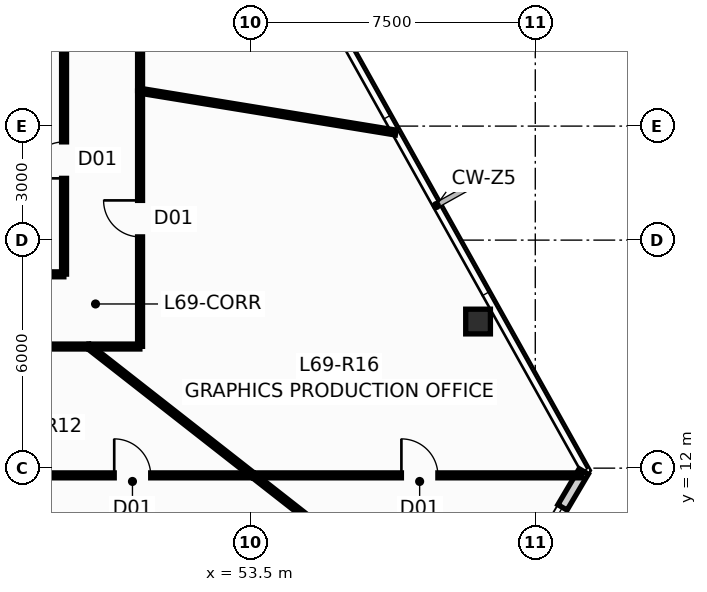
"""IFC4 building model, lengths in metres.
Left out: names, types, materials, properties, quantities, classifications, styles, units other than length and angle.
Written with IfcOpenShell. Run it as: python <this file> out.ifc"""

import sys

from ifc_helpers import new_model, si_unit, direction, frame, frame_2d, origin, origin_2d, place, context, subcontext, project, spatial, rectangle, hollow_rectangle, extrude, source, transform, mapped, element, fill, save


model = new_model("IFC4")
c1 = context("Model", 3, precision=1e-05, world=origin(), true_north=direction((0.0, 1.0)))
c2 = subcontext(c1, "Body", "Model", "MODEL_VIEW")
j1 = project(units=[si_unit("LENGTHUNIT", "METRE"), si_unit("PLANEANGLEUNIT", "RADIAN")], contexts=[c1])
p1 = place(None, origin())
s1 = spatial("IfcSite", under=j1, at=p1, CompositionType="ELEMENT")
p2 = place(p1, origin())
s2 = spatial("IfcBuilding", under=s1, at=p2, CompositionType="ELEMENT")
p3 = place(p2, frame((0.0, 0.0, 262.7)))
s3 = spatial("IfcBuildingStorey", under=s2, at=p3, CompositionType="ELEMENT", Elevation=262.7)
m1 = source(origin(), c2, "Body", "SweptSolid", [
    extrude(hollow_rectangle(XDim=0.65, YDim=0.65, WallThickness=0.04, at=origin_2d()), origin(), (0.0, 0.0, 1.0), 3.651),
])
p4 = place(p3, frame((59.494, 15.857, 0.0), z_axis=(-0.010364239282, -0.021530871282, 0.999714461297), x_axis=(0.901042175273, -0.433731481886, 0.0)))
e1 = element("IfcColumn", 1, at=p4, inside=s3, PredefinedType="COLUMN", context=c2, shape_type="MappedRepresentation", body=[
    mapped(m1, transform((0.0, 0.0, 0.0), scale=1.0)),
])
p5 = place(p3, frame((62.275, 11.914, 0.0), z_axis=(0.0, 0.0, 1.0), x_axis=(-0.508480349424, -0.86107359398, 0.0)))
e2 = element("IfcWall", 2, at=p5, inside=s3, PredefinedType="STANDARD", context=c2, shape_type="SweptSolid", body=[
    extrude(rectangle(XDim=3.403, YDim=0.28, at=frame_2d((1.702, 0.0))), origin(), (0.0, 0.0, 1.0), 3.4),
])
p6 = place(p5, frame((1.1, 0.0, 0.9)))
e3 = element("IfcOpeningElement", 3, at=p6, cuts=e2, PredefinedType="OPENING", context=c2, shape_type="SweptSolid", body=[
    extrude(rectangle(XDim=1.2, YDim=1.65, at=frame_2d((0.6, 0.825))), frame((0.0, 0.152, 0.0), z_axis=(0.0, -1.0, 0.0), x_axis=(1.0, 0.0, 0.0)), (0.0, 0.0, 1.0), 0.304),
])
p7 = place(p3, frame((53.585, 11.81, 0.0), z_axis=(0.0, 0.0, 1.0), x_axis=(1.0, 0.0, 0.0)))
e4 = element("IfcWall", 4, at=p7, inside=s3, PredefinedType="PARTITIONING", context=c2, shape_type="SweptSolid", body=[
    extrude(rectangle(XDim=8.634, YDim=0.13, at=frame_2d((4.317, 0.0))), origin(), (0.0, 0.0, 1.0), 3.4),
])
p8 = place(p7, frame((3.892, 0.0, 0.0)))
e5 = element("IfcOpeningElement", 5, at=p8, cuts=e4, PredefinedType="OPENING", context=c2, shape_type="SweptSolid", body=[
    extrude(rectangle(XDim=0.96, YDim=2.15, at=frame_2d((0.48, 1.075))), frame((0.0, 0.077, 0.0), z_axis=(0.0, -1.0, 0.0), x_axis=(1.0, 0.0, 0.0)), (0.0, 0.0, 1.0), 0.154),
])
p9 = place(p3, frame((50.605, 21.929, 0.0), z_axis=(0.0, 0.0, 1.0), x_axis=(0.986902504293, -0.161317844706, 0.0)))
e6 = element("IfcWall", 6, at=p9, inside=s3, PredefinedType="PARTITIONING", context=c2, shape_type="SweptSolid", body=[
    extrude(rectangle(XDim=6.812, YDim=0.13, at=frame_2d((3.406, 0.0))), origin(), (0.0, 0.0, 1.0), 3.4),
])
p10 = place(p3, frame((50.6, 21.935, 0.0), z_axis=(0.0, 0.0, 1.0), x_axis=(0.0, 1.0, 0.0)))
e7 = element("IfcWall", 7, at=p10, inside=s3, PredefinedType="PARTITIONING", context=c2, shape_type="SweptSolid", body=[
    extrude(rectangle(XDim=6.76, YDim=0.13, at=frame_2d((3.38, 0.0))), origin(), (0.0, 0.0, 1.0), 3.085),
])
p11 = place(p10, frame((2.9, 0.0, 0.0)))
e8 = element("IfcOpeningElement", 8, at=p11, cuts=e7, PredefinedType="OPENING", context=c2, shape_type="SweptSolid", body=[
    extrude(rectangle(XDim=0.96, YDim=2.15, at=frame_2d((0.48, 1.075))), frame((0.0, 0.077, 0.0), z_axis=(0.0, -1.0, 0.0), x_axis=(1.0, 0.0, 0.0)), (0.0, 0.0, 1.0), 0.154),
])
p12 = place(p3, frame((50.6, 15.205, 0.0), z_axis=(0.0, 0.0, 1.0), x_axis=(0.0, 1.0, 0.0)))
e9 = element("IfcWall", 9, at=p12, inside=s3, PredefinedType="PARTITIONING", context=c2, shape_type="SweptSolid", body=[
    extrude(rectangle(XDim=6.72, YDim=0.13, at=frame_2d((3.36, 0.0))), origin(), (0.0, 0.0, 1.0), 3.085),
])
p13 = place(p12, frame((2.88, 0.0, 0.0)))
e10 = element("IfcOpeningElement", 10, at=p13, cuts=e9, PredefinedType="OPENING", context=c2, shape_type="SweptSolid", body=[
    extrude(rectangle(XDim=0.96, YDim=2.15, at=frame_2d((0.48, 1.075))), frame((0.0, 0.077, 0.0), z_axis=(0.0, -1.0, 0.0), x_axis=(1.0, 0.0, 0.0)), (0.0, 0.0, 1.0), 0.154),
])
p14 = place(p3, frame((47.225, 11.81, 0.0), z_axis=(0.0, 0.0, 1.0), x_axis=(1.0, 0.0, 0.0)))
e11 = element("IfcWall", 11, at=p14, inside=s3, PredefinedType="PARTITIONING", context=c2, shape_type="SweptSolid", body=[
    extrude(rectangle(XDim=6.35, YDim=0.13, at=frame_2d((3.175, 0.0))), origin(), (0.0, 0.0, 1.0), 3.085),
])
p15 = place(p14, frame((2.695, 0.0, 0.0)))
e12 = element("IfcOpeningElement", 12, at=p15, cuts=e11, PredefinedType="OPENING", context=c2, shape_type="SweptSolid", body=[
    extrude(rectangle(XDim=0.96, YDim=2.15, at=frame_2d((0.48, 1.075))), frame((0.0, 0.077, 0.0), z_axis=(0.0, -1.0, 0.0), x_axis=(1.0, 0.0, 0.0)), (0.0, 0.0, 1.0), 0.154),
])
p16 = place(p3, frame((48.6, 17.105, 0.0), z_axis=(0.0, 0.0, 1.0), x_axis=(0.0, 1.0, 0.0)))
e13 = element("IfcWall", 13, at=p16, inside=s3, PredefinedType="PARTITIONING", context=c2, shape_type="SweptSolid", body=[
    extrude(rectangle(XDim=6.0, YDim=0.13, at=frame_2d((3.0, 0.0))), origin(), (0.0, 0.0, 1.0), 3.085),
])
p17 = place(p16, frame((2.52, 0.0, 0.0)))
e14 = element("IfcOpeningElement", 14, at=p17, cuts=e13, PredefinedType="OPENING", context=c2, shape_type="SweptSolid", body=[
    extrude(rectangle(XDim=0.96, YDim=2.15, at=frame_2d((0.48, 1.075))), frame((0.0, 0.077, 0.0), z_axis=(0.0, -1.0, 0.0), x_axis=(1.0, 0.0, 0.0)), (0.0, 0.0, 1.0), 0.154),
])
p18 = place(p3, frame((49.254, 15.197, 0.0), z_axis=(0.0, 0.0, 1.0), x_axis=(0.787365138275, -0.61648693338, 0.0)))
e15 = element("IfcWall", 15, at=p18, inside=s3, PredefinedType="PARTITIONING", context=c2, shape_type="SweptSolid", body=[
    extrude(rectangle(XDim=5.489, YDim=0.13, at=frame_2d((2.745, 0.0))), origin(), (0.0, 0.0, 1.0), 2.985),
])
p19 = place(p3, frame((53.584, 11.807, 0.0), z_axis=(0.0, 0.0, 1.0), x_axis=(0.7873705788, -0.616479984784, 0.0)))
e16 = element("IfcWall", 16, at=p19, inside=s3, PredefinedType="PARTITIONING", context=c2, shape_type="SweptSolid", body=[
    extrude(rectangle(XDim=4.753, YDim=0.13, at=frame_2d((2.376, 0.0))), origin(), (0.0, 0.0, 1.0), 2.985),
])
p20 = place(p3, frame((44.665, 15.2, 0.0), z_axis=(0.0, 0.0, 1.0), x_axis=(1.0, 0.0, 0.0)))
e17 = element("IfcWall", 17, at=p20, inside=s3, PredefinedType="PARTITIONING", context=c2, shape_type="SweptSolid", body=[
    extrude(rectangle(XDim=4.58, YDim=0.13, at=frame_2d((2.29, 0.0))), origin(), (0.0, 0.0, 1.0), 3.085),
])
p21 = place(p20, frame((1.81, 0.0, 0.0)))
e18 = element("IfcOpeningElement", 18, at=p21, cuts=e17, PredefinedType="OPENING", context=c2, shape_type="SweptSolid", body=[
    extrude(rectangle(XDim=0.96, YDim=2.15, at=frame_2d((0.48, 1.075))), frame((0.0, 0.077, 0.0), z_axis=(0.0, -1.0, 0.0), x_axis=(1.0, 0.0, 0.0)), (0.0, 0.0, 1.0), 0.154),
])
p22 = place(p3, frame((47.223, 11.806, 0.0), z_axis=(0.0, 0.0, 1.0), x_axis=(0.60360488917, -0.797283599336, 0.0)))
e19 = element("IfcWall", 19, at=p22, inside=s3, PredefinedType="PARTITIONING", context=c2, shape_type="SweptSolid", body=[
    extrude(rectangle(XDim=3.905, YDim=0.13, at=frame_2d((1.953, 0.0))), origin(), (0.0, 0.0, 1.0), 3.4),
])
p23 = place(p3, frame((46.825, 17.1, 0.0), z_axis=(0.0, 0.0, 1.0), x_axis=(1.0, 0.0, 0.0)))
e20 = element("IfcWall", 20, at=p23, inside=s3, PredefinedType="PARTITIONING", context=c2, shape_type="SweptSolid", body=[
    extrude(rectangle(XDim=1.77, YDim=0.13, at=frame_2d((0.885, 0.0))), origin(), (0.0, 0.0, 1.0), 2.985),
])
p24 = place(p3, frame((49.255, 15.2, 0.0), z_axis=(0.0, 0.0, 1.0), x_axis=(1.0, 0.0, 0.0)))
e21 = element("IfcWall", 21, at=p24, inside=s3, PredefinedType="PARTITIONING", context=c2, shape_type="SweptSolid", body=[
    extrude(rectangle(XDim=1.34, YDim=0.13, at=frame_2d((0.67, 0.0))), origin(), (0.0, 0.0, 1.0), 3.4),
])
p25 = place(p6, origin())
e22 = element("IfcWindow", 22, at=p25, inside=s3, PartitioningType="SINGLE_PANEL", PredefinedType="WINDOW", context=c2, shape_type="SweptSolid", body=[
    extrude(rectangle(XDim=1.2, YDim=1.65, at=frame_2d((0.6, 0.825))), frame((0.0, 0.03, 0.0), z_axis=(0.0, -1.0, 0.0), x_axis=(1.0, 0.0, 0.0)), (0.0, 0.0, 1.0), 0.06),
])
fill(e3, e22)
p26 = place(p8, origin())
e23 = element("IfcDoor", 23, at=p26, inside=s3, OperationType="SINGLE_SWING_LEFT", PredefinedType="DOOR", context=c2, shape_type="SweptSolid", body=[
    extrude(rectangle(XDim=0.96, YDim=2.15, at=frame_2d((0.48, 1.075))), frame((0.0, 0.025, 0.0), z_axis=(0.0, -1.0, 0.0), x_axis=(1.0, 0.0, 0.0)), (0.0, 0.0, 1.0), 0.05),
])
fill(e5, e23)
p27 = place(p13, origin())
e24 = element("IfcDoor", 24, at=p27, inside=s3, OperationType="SINGLE_SWING_RIGHT", PredefinedType="DOOR", context=c2, shape_type="SweptSolid", body=[
    extrude(rectangle(XDim=0.96, YDim=2.15, at=frame_2d((0.48, 1.075))), frame((0.0, 0.025, 0.0), z_axis=(0.0, -1.0, 0.0), x_axis=(1.0, 0.0, 0.0)), (0.0, 0.0, 1.0), 0.05),
])
fill(e10, e24)
p28 = place(p15, origin())
e25 = element("IfcDoor", 25, at=p28, inside=s3, OperationType="SINGLE_SWING_LEFT", PredefinedType="DOOR", context=c2, shape_type="SweptSolid", body=[
    extrude(rectangle(XDim=0.96, YDim=2.15, at=frame_2d((0.48, 1.075))), frame((0.0, 0.025, 0.0), z_axis=(0.0, -1.0, 0.0), x_axis=(1.0, 0.0, 0.0)), (0.0, 0.0, 1.0), 0.05),
])
fill(e12, e25)
p29 = place(p17, origin())
e26 = element("IfcDoor", 26, at=p29, inside=s3, OperationType="SINGLE_SWING_LEFT", PredefinedType="DOOR", context=c2, shape_type="SweptSolid", body=[
    extrude(rectangle(XDim=0.96, YDim=2.15, at=frame_2d((0.48, 1.075))), frame((0.0, 0.025, 0.0), z_axis=(0.0, -1.0, 0.0), x_axis=(1.0, 0.0, 0.0)), (0.0, 0.0, 1.0), 0.05),
])
fill(e14, e26)
save(model, sys.argv[1])
